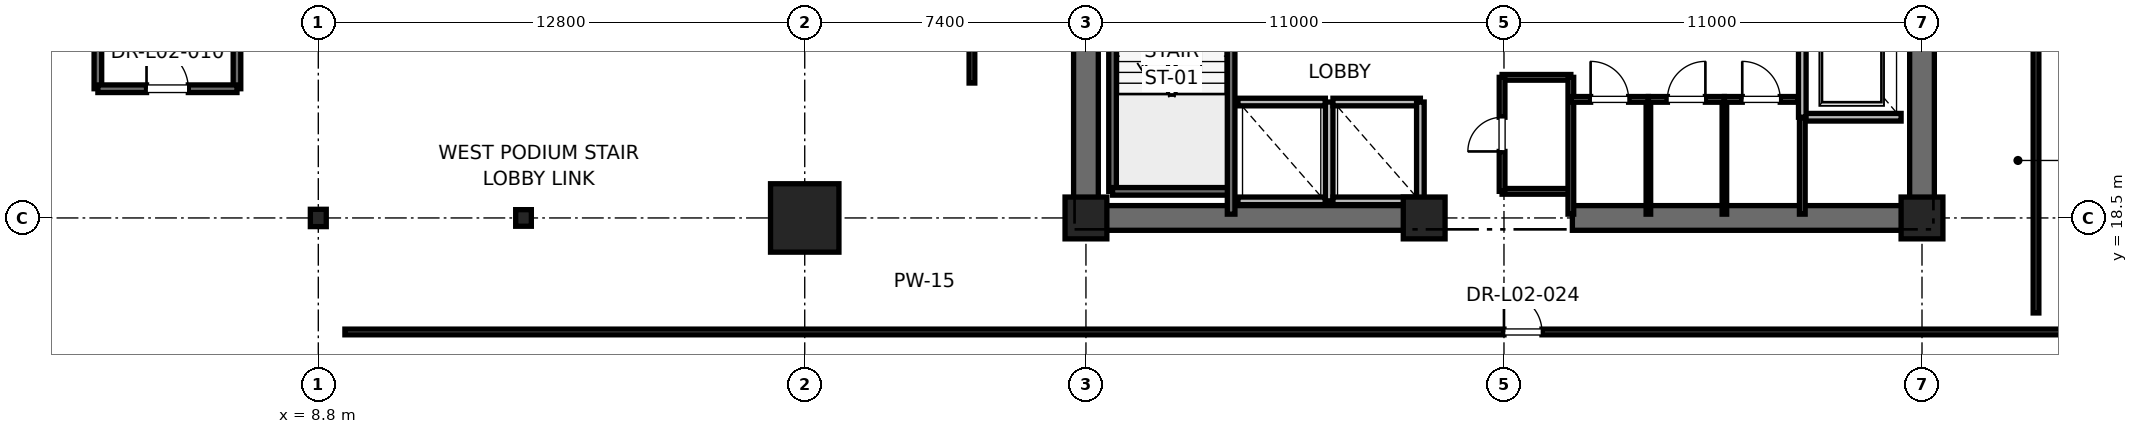
"""IFC4 building model, lengths in metres.
Left out: names, types, materials, properties, quantities, classifications, styles, units other than length and angle.
Written with IfcOpenShell. Run it as: python <this file> out.ifc"""

import sys

from ifc_helpers import new_model, si_unit, direction, frame, frame_2d, origin, origin_2d, place, context, subcontext, project, spatial, rectangle, i_section, extrude, element, fill, save


model = new_model("IFC4")
c1 = context("Model", 3, precision=1e-05, world=origin(), true_north=direction((0.0, 1.0)))
c2 = subcontext(c1, "Body", "Model", "MODEL_VIEW")
j1 = project(units=[si_unit("LENGTHUNIT", "METRE"), si_unit("PLANEANGLEUNIT", "RADIAN")], contexts=[c1])
p1 = place(None, origin())
s1 = spatial("IfcSite", under=j1, at=p1, CompositionType="ELEMENT")
p2 = place(p1, origin())
s2 = spatial("IfcBuilding", under=s1, at=p2, CompositionType="ELEMENT")
p3 = place(p2, frame((0.0, 0.0, 11.2)))
s3 = spatial("IfcBuildingStorey", under=s2, at=p3, CompositionType="ELEMENT", Elevation=11.2)
p4 = place(p3, frame((21.6, 18.5, 0.0), z_axis=(0.0, 0.0, 1.0), x_axis=(1.0, 0.0, 0.0)))
e1 = element("IfcColumn", 1, at=p4, inside=s3, PredefinedType="COLUMN", context=c2, shape_type="SweptSolid", body=[
    extrude(rectangle(XDim=1.8, YDim=1.8, at=origin_2d()), origin(), (0.0, 0.0, 1.0), 5.2),
])
p5 = place(p3, frame((14.2, 18.5, 0.0), z_axis=(0.0, 0.0, 1.0), x_axis=(1.0, 0.0, 0.0)))
e2 = element("IfcColumn", 2, at=p5, inside=s3, PredefinedType="COLUMN", context=c2, shape_type="SweptSolid", body=[
    extrude(i_section(OverallWidth=0.412, OverallDepth=0.437, WebThickness=0.036, FlangeThickness=0.058, FilletRadius=0.015, at=origin_2d()), origin(), (0.0, 0.0, 1.0), 5.2),
])
for number, where, z_axis, x_axis in (
    (3, (29.0, 18.5, 0.0), (0.0, 0.0, 1.0), (1.0, 0.0, 0.0)),
    (4, (51.0, 18.5, 0.0), (0.0, 0.0, 1.0), (1.0, 0.0, 0.0)),
    (5, (37.9, 18.5, 0.0), (0.0, 0.0, 1.0), (1.0, 0.0, 0.0)),
):
    element("IfcColumn", number, at=place(p3, frame(where, z_axis=z_axis, x_axis=x_axis)), inside=s3, PredefinedType="PILASTER", context=c2, shape_type="SweptSolid", body=[
        extrude(rectangle(XDim=1.1, YDim=1.1, at=origin_2d()), origin(), (0.0, 0.0, 1.0), 5.2),
    ])
p6 = place(p3, frame((8.8, 18.5, 0.0), z_axis=(0.0, 0.0, 1.0), x_axis=(1.0, 0.0, 0.0)))
e6 = element("IfcColumn", 6, at=p6, inside=s3, PredefinedType="COLUMN", context=c2, shape_type="SweptSolid", body=[
    extrude(i_section(OverallWidth=0.418, OverallDepth=0.456, WebThickness=0.042, FlangeThickness=0.067, FilletRadius=0.015, at=origin_2d()), origin(), (0.0, 0.0, 1.0), 5.2),
])
for number, where, z_axis, x_axis in (
    (7, (29.0, 18.5, 0.0), (0.0, 0.0, 1.0), (1.0, 0.0, 0.0)),
    (8, (41.8, 18.5, 0.0), (0.0, 0.0, 1.0), (1.0, 0.0, 0.0)),
):
    element("IfcWall", number, at=place(p3, frame(where, z_axis=z_axis, x_axis=x_axis)), inside=s3, PredefinedType="SHEAR", context=c2, shape_type="SweptSolid", body=[
        extrude(rectangle(XDim=9.2, YDim=0.65, at=frame_2d((4.6, 0.0))), origin(), (0.0, 0.0, 1.0), 4.92),
    ])
p7 = place(p3, frame((29.0, 18.5, 0.0), z_axis=(0.0, 0.0, 1.0), x_axis=(0.0, 1.0, 0.0)))
e9 = element("IfcWall", 9, at=p7, inside=s3, PredefinedType="SHEAR", context=c2, shape_type="SweptSolid", body=[
    extrude(rectangle(XDim=8.8, YDim=0.65, at=frame_2d((4.4, 0.0))), origin(), (0.0, 0.0, 1.0), 4.92),
])
p8 = place(p3, frame((51.0, 18.5, 0.0), z_axis=(0.0, 0.0, 1.0), x_axis=(0.0, 1.0, 0.0)))
e10 = element("IfcWall", 10, at=p8, inside=s3, PredefinedType="SHEAR", context=c2, shape_type="SweptSolid", body=[
    extrude(rectangle(XDim=5.8, YDim=0.65, at=frame_2d((2.9, 0.0))), origin(), (0.0, 0.0, 1.0), 4.92),
])
p9 = place(p3, frame((29.7, 19.2, 0.0), z_axis=(0.0, 0.0, 1.0), x_axis=(0.0, 1.0, 0.0)))
e11 = element("IfcWall", 11, at=p9, inside=s3, PredefinedType="SOLIDWALL", context=c2, shape_type="SweptSolid", body=[
    extrude(rectangle(XDim=8.15, YDim=0.2, at=frame_2d((4.075, 0.0))), origin(), (0.0, 0.0, 1.0), 4.92),
])
p10 = place(p3, frame((29.7, 19.2, 0.0), z_axis=(0.0, 0.0, 1.0), x_axis=(1.0, 0.0, 0.0)))
e12 = element("IfcWall", 12, at=p10, inside=s3, PredefinedType="SOLIDWALL", context=c2, shape_type="SweptSolid", body=[
    extrude(rectangle(XDim=3.12, YDim=0.2, at=frame_2d((1.56, 0.0))), origin(), (0.0, 0.0, 1.0), 4.92),
])
p11 = place(p3, frame((32.82, 18.6, 0.0), z_axis=(0.0, 0.0, 1.0), x_axis=(0.0, 1.0, 0.0)))
e13 = element("IfcWall", 13, at=p11, inside=s3, PredefinedType="SOLIDWALL", context=c2, shape_type="SweptSolid", body=[
    extrude(rectangle(XDim=8.78, YDim=0.2, at=frame_2d((4.39, 0.0))), origin(), (0.0, 0.0, 1.0), 4.92),
])
for number, where, z_axis, x_axis in (
    (14, (3.0, 21.9, 0.0), (0.0, 0.0, 1.0), (0.0, 1.0, 0.0)),
    (15, (6.66, 21.9, 0.0), (0.0, 0.0, 1.0), (0.0, 1.0, 0.0)),
):
    element("IfcWall", number, at=place(p3, frame(where, z_axis=z_axis, x_axis=x_axis)), inside=s3, PredefinedType="SOLIDWALL", context=c2, shape_type="SweptSolid", body=[
        extrude(rectangle(XDim=8.7, YDim=0.2, at=frame_2d((4.35, 0.0))), origin(), (0.0, 0.0, 1.0), 4.92),
    ])
p12 = place(p3, frame((3.0, 21.9, 0.0), z_axis=(0.0, 0.0, 1.0), x_axis=(1.0, 0.0, 0.0)))
e16 = element("IfcWall", 16, at=p12, inside=s3, PredefinedType="SOLIDWALL", context=c2, shape_type="SweptSolid", body=[
    extrude(rectangle(XDim=3.66, YDim=0.2, at=frame_2d((1.83, 0.0))), origin(), (0.0, 0.0, 1.0), 4.92),
])
p13 = place(p12, frame((1.28, 0.0, 0.0)))
e17 = element("IfcOpeningElement", 17, at=p13, cuts=e16, PredefinedType="OPENING", context=c2, shape_type="SweptSolid", body=[
    extrude(rectangle(XDim=1.1, YDim=2.15, at=frame_2d((0.55, 1.075))), frame((0.0, 0.1, 0.0), z_axis=(0.0, -1.0, 0.0), x_axis=(1.0, 0.0, 0.0)), (0.0, 0.0, 1.0), 0.2),
])
p14 = place(p3, frame((47.85, 21.15, 0.0), z_axis=(0.0, 0.0, 1.0), x_axis=(1.0, 0.0, 0.0)))
e18 = element("IfcWall", 18, at=p14, inside=s3, PredefinedType="SOLIDWALL", context=c2, shape_type="SweptSolid", body=[
    extrude(rectangle(XDim=2.6, YDim=0.2, at=frame_2d((1.3, 0.0))), origin(), (0.0, 0.0, 1.0), 4.92),
])
p15 = place(p3, frame((47.85, 24.15, 0.0), z_axis=(0.0, 0.0, 1.0), x_axis=(0.0, -1.0, 0.0)))
e19 = element("IfcWall", 19, at=p15, inside=s3, PredefinedType="SOLIDWALL", context=c2, shape_type="SweptSolid", body=[
    extrude(rectangle(XDim=3.0, YDim=0.2, at=frame_2d((1.5, 0.0))), origin(), (0.0, 0.0, 1.0), 4.92),
])
for number, where, z_axis, x_axis in (
    (20, (33.0, 18.95, 0.0), (0.0, 0.0, 1.0), (1.0, 0.0, 0.0)),
    (21, (35.3, 21.55, 0.0), (0.0, 0.0, 1.0), (-1.0, 0.0, 0.0)),
):
    element("IfcWall", number, at=place(p3, frame(where, z_axis=z_axis, x_axis=x_axis)), inside=s3, PredefinedType="SOLIDWALL", context=c2, shape_type="SweptSolid", body=[
        extrude(rectangle(XDim=2.3, YDim=0.2, at=frame_2d((1.15, 0.0))), origin(), (0.0, 0.0, 1.0), 4.92),
    ])
p16 = place(p3, frame((35.4, 18.95, 0.0), z_axis=(0.0, 0.0, 1.0), x_axis=(0.0, 1.0, 0.0)))
e22 = element("IfcWall", 22, at=p16, inside=s3, PredefinedType="SOLIDWALL", context=c2, shape_type="SweptSolid", body=[
    extrude(rectangle(XDim=2.6, YDim=0.2, at=frame_2d((1.3, 0.0))), origin(), (0.0, 0.0, 1.0), 4.92),
])
p17 = place(p3, frame((35.5, 18.95, 0.0), z_axis=(0.0, 0.0, 1.0), x_axis=(1.0, 0.0, 0.0)))
e23 = element("IfcWall", 23, at=p17, inside=s3, PredefinedType="SOLIDWALL", context=c2, shape_type="SweptSolid", body=[
    extrude(rectangle(XDim=2.3, YDim=0.2, at=frame_2d((1.15, 0.0))), origin(), (0.0, 0.0, 1.0), 3.7),
])
p18 = place(p3, frame((37.8, 21.55, 0.0), z_axis=(0.0, 0.0, 1.0), x_axis=(-1.0, 0.0, 0.0)))
e24 = element("IfcWall", 24, at=p18, inside=s3, PredefinedType="SOLIDWALL", context=c2, shape_type="SweptSolid", body=[
    extrude(rectangle(XDim=2.3, YDim=0.2, at=frame_2d((1.15, 0.0))), origin(), (0.0, 0.0, 1.0), 4.92),
])
p19 = place(p3, frame((37.8, 18.95, 0.0), z_axis=(0.0, 0.0, 1.0), x_axis=(0.0, 1.0, 0.0)))
e25 = element("IfcWall", 25, at=p19, inside=s3, PredefinedType="SOLIDWALL", context=c2, shape_type="SweptSolid", body=[
    extrude(rectangle(XDim=2.6, YDim=0.2, at=frame_2d((1.3, 0.0))), origin(), (0.0, 0.0, 1.0), 3.7),
])
for number, where, z_axis, x_axis in (
    (26, (39.95, 19.2, 0.0), (0.0, 0.0, 1.0), (1.0, 0.0, 0.0)),
    (27, (39.95, 22.2, 0.0), (0.0, 0.0, 1.0), (1.0, 0.0, 0.0)),
):
    element("IfcWall", number, at=place(p3, frame(where, z_axis=z_axis, x_axis=x_axis)), inside=s3, PredefinedType="PARTITIONING", context=c2, shape_type="SweptSolid", body=[
        extrude(rectangle(XDim=1.81, YDim=0.15, at=frame_2d((0.905, 0.0))), origin(), (0.0, 0.0, 1.0), 2.85),
    ])
p20 = place(p3, frame((41.76, 18.6, 0.0), z_axis=(0.0, 0.0, 1.0), x_axis=(0.0, 1.0, 0.0)))
e28 = element("IfcWall", 28, at=p20, inside=s3, PredefinedType="PARTITIONING", context=c2, shape_type="SweptSolid", body=[
    extrude(rectangle(XDim=3.6, YDim=0.15, at=frame_2d((1.8, 0.0))), origin(), (0.0, 0.0, 1.0), 2.85),
])
p21 = place(p3, frame((39.95, 19.2, 0.0), z_axis=(0.0, 0.0, 1.0), x_axis=(0.0, 1.0, 0.0)))
e29 = element("IfcWall", 29, at=p21, inside=s3, PredefinedType="PARTITIONING", context=c2, shape_type="SweptSolid", body=[
    extrude(rectangle(XDim=3.0, YDim=0.15, at=frame_2d((1.5, 0.0))), origin(), (0.0, 0.0, 1.0), 2.85),
])
p22 = place(p21, frame((1.05, 0.0, 0.0)))
e30 = element("IfcOpeningElement", 30, at=p22, cuts=e29, PredefinedType="OPENING", context=c2, shape_type="SweptSolid", body=[
    extrude(rectangle(XDim=0.9, YDim=2.1, at=frame_2d((0.45, 1.05))), frame((0.0, 0.075, 0.0), z_axis=(0.0, -1.0, 0.0), x_axis=(1.0, 0.0, 0.0)), (0.0, 0.0, 1.0), 0.15),
])
p23 = place(p3, frame((47.85, 18.6, 0.0), z_axis=(0.0, 0.0, 1.0), x_axis=(0.0, 1.0, 0.0)))
e31 = element("IfcWall", 31, at=p23, inside=s3, PredefinedType="PARTITIONING", context=c2, shape_type="SweptSolid", body=[
    extrude(rectangle(XDim=2.54, YDim=0.15, at=frame_2d((1.27, 0.0))), origin(), (0.0, 0.0, 1.0), 2.85),
])
for number, where, z_axis, x_axis in (
    (32, (43.8, 18.6, 0.0), (0.0, 0.0, 1.0), (0.0, 1.0, 0.0)),
    (33, (45.8, 18.6, 0.0), (0.0, 0.0, 1.0), (0.0, 1.0, 0.0)),
):
    element("IfcWall", number, at=place(p3, frame(where, z_axis=z_axis, x_axis=x_axis)), inside=s3, PredefinedType="PARTITIONING", context=c2, shape_type="SweptSolid", body=[
        extrude(rectangle(XDim=3.02, YDim=0.12, at=frame_2d((1.51, 0.0))), origin(), (0.0, 0.0, 1.0), 2.85),
    ])
p24 = place(p3, frame((41.76, 21.62, 0.0), z_axis=(0.0, 0.0, 1.0), x_axis=(1.0, 0.0, 0.0)))
e34 = element("IfcWall", 34, at=p24, inside=s3, PredefinedType="PARTITIONING", context=c2, shape_type="SweptSolid", body=[
    extrude(rectangle(XDim=2.04, YDim=0.15, at=frame_2d((1.02, 0.0))), origin(), (0.0, 0.0, 1.0), 2.85),
])
p25 = place(p24, frame((0.52, 0.0, 0.0)))
e35 = element("IfcOpeningElement", 35, at=p25, cuts=e34, PredefinedType="OPENING", context=c2, shape_type="SweptSolid", body=[
    extrude(rectangle(XDim=1.0, YDim=2.15, at=frame_2d((0.5, 1.075))), frame((0.0, 0.075, 0.0), z_axis=(0.0, -1.0, 0.0), x_axis=(1.0, 0.0, 0.0)), (0.0, 0.0, 1.0), 0.15),
])
p26 = place(p3, frame((43.8, 21.62, 0.0), z_axis=(0.0, 0.0, 1.0), x_axis=(1.0, 0.0, 0.0)))
e36 = element("IfcWall", 36, at=p26, inside=s3, PredefinedType="PARTITIONING", context=c2, shape_type="SweptSolid", body=[
    extrude(rectangle(XDim=2.0, YDim=0.15, at=frame_2d((1.0, 0.0))), origin(), (0.0, 0.0, 1.0), 2.85),
])
p27 = place(p26, frame((0.5, 0.0, 0.0)))
e37 = element("IfcOpeningElement", 37, at=p27, cuts=e36, PredefinedType="OPENING", context=c2, shape_type="SweptSolid", body=[
    extrude(rectangle(XDim=1.0, YDim=2.15, at=frame_2d((0.5, 1.075))), frame((0.0, 0.075, 0.0), z_axis=(0.0, -1.0, 0.0), x_axis=(1.0, 0.0, 0.0)), (0.0, 0.0, 1.0), 0.15),
])
p28 = place(p3, frame((45.8, 21.62, 0.0), z_axis=(0.0, 0.0, 1.0), x_axis=(1.0, 0.0, 0.0)))
e38 = element("IfcWall", 38, at=p28, inside=s3, PredefinedType="PARTITIONING", context=c2, shape_type="SweptSolid", body=[
    extrude(rectangle(XDim=1.94, YDim=0.15, at=frame_2d((0.97, 0.0))), origin(), (0.0, 0.0, 1.0), 2.85),
])
p29 = place(p28, frame((0.47, 0.0, 0.0)))
e39 = element("IfcOpeningElement", 39, at=p29, cuts=e38, PredefinedType="OPENING", context=c2, shape_type="SweptSolid", body=[
    extrude(rectangle(XDim=1.0, YDim=2.15, at=frame_2d((0.5, 1.075))), frame((0.0, 0.075, 0.0), z_axis=(0.0, -1.0, 0.0), x_axis=(1.0, 0.0, 0.0)), (0.0, 0.0, 1.0), 0.15),
])
p30 = place(p3, frame((9.5, 15.5, 0.0), z_axis=(0.0, 0.0, 1.0), x_axis=(1.0, 0.0, 0.0)))
e40 = element("IfcWall", 40, at=p30, inside=s3, PredefinedType="PARTITIONING", context=c2, shape_type="SweptSolid", body=[
    extrude(rectangle(XDim=62.0, YDim=0.15, at=frame_2d((31.0, 0.0))), origin(), (0.0, 0.0, 1.0), 2.85),
])
p31 = place(p30, frame((30.5, 0.0, 0.0)))
e41 = element("IfcOpeningElement", 41, at=p31, cuts=e40, PredefinedType="OPENING", context=c2, shape_type="SweptSolid", body=[
    extrude(rectangle(XDim=1.0, YDim=2.15, at=frame_2d((0.5, 1.075))), frame((0.0, 0.075, 0.0), z_axis=(0.0, -1.0, 0.0), x_axis=(1.0, 0.0, 0.0)), (0.0, 0.0, 1.0), 0.15),
])
p32 = place(p3, frame((26.0, 22.05, 0.0), z_axis=(0.0, 0.0, 1.0), x_axis=(0.0, 1.0, 0.0)))
e42 = element("IfcWall", 42, at=p32, inside=s3, PredefinedType="PARTITIONING", context=c2, shape_type="SweptSolid", body=[
    extrude(rectangle(XDim=16.95, YDim=0.15, at=frame_2d((8.475, 0.0))), origin(), (0.0, 0.0, 1.0), 2.85),
])
p33 = place(p32, frame((6.675, 0.0, 0.0)))
e43 = element("IfcOpeningElement", 43, at=p33, cuts=e42, PredefinedType="OPENING", context=c2, shape_type="SweptSolid", body=[
    extrude(rectangle(XDim=1.0, YDim=2.15, at=frame_2d((0.5, 1.075))), frame((0.0, 0.075, 0.0), z_axis=(0.0, -1.0, 0.0), x_axis=(1.0, 0.0, 0.0)), (0.0, 0.0, 1.0), 0.15),
])
p34 = place(p3, frame((54.0, 16.0, 0.0), z_axis=(0.0, 0.0, 1.0), x_axis=(0.0, 1.0, 0.0)))
e44 = element("IfcWall", 44, at=p34, inside=s3, PredefinedType="PARTITIONING", context=c2, shape_type="SweptSolid", body=[
    extrude(rectangle(XDim=14.45, YDim=0.15, at=frame_2d((7.225, 0.0))), origin(), (0.0, 0.0, 1.0), 2.85),
])
p35 = place(p34, frame((8.025, 0.0, 0.0)))
e45 = element("IfcOpeningElement", 45, at=p35, cuts=e44, PredefinedType="OPENING", context=c2, shape_type="SweptSolid", body=[
    extrude(rectangle(XDim=1.0, YDim=2.15, at=frame_2d((0.5, 1.075))), frame((0.0, 0.075, 0.0), z_axis=(0.0, -1.0, 0.0), x_axis=(1.0, 0.0, 0.0)), (0.0, 0.0, 1.0), 0.15),
])
p36 = place(p13, origin())
e46 = element("IfcDoor", 46, at=p36, inside=s3, OperationType="SINGLE_SWING_LEFT", PredefinedType="DOOR", context=c2, shape_type="SweptSolid", body=[
    extrude(rectangle(XDim=1.1, YDim=2.15, at=frame_2d((0.55, 1.075))), frame((0.0, 0.025, 0.0), z_axis=(0.0, -1.0, 0.0), x_axis=(1.0, 0.0, 0.0)), (0.0, 0.0, 1.0), 0.05),
])
fill(e17, e46)
p37 = place(p22, origin())
e47 = element("IfcDoor", 47, at=p37, inside=s3, OperationType="SINGLE_SWING_LEFT", PredefinedType="DOOR", context=c2, shape_type="SweptSolid", body=[
    extrude(rectangle(XDim=0.9, YDim=2.1, at=frame_2d((0.45, 1.05))), frame((0.0, 0.025, 0.0), z_axis=(0.0, -1.0, 0.0), x_axis=(1.0, 0.0, 0.0)), (0.0, 0.0, 1.0), 0.05),
])
fill(e30, e47)
p38 = place(p25, origin())
e48 = element("IfcDoor", 48, at=p38, inside=s3, OperationType="SINGLE_SWING_LEFT", PredefinedType="DOOR", context=c2, shape_type="SweptSolid", body=[
    extrude(rectangle(XDim=1.0, YDim=2.15, at=frame_2d((0.5, 1.075))), frame((0.0, 0.025, 0.0), z_axis=(0.0, -1.0, 0.0), x_axis=(1.0, 0.0, 0.0)), (0.0, 0.0, 1.0), 0.05),
])
fill(e35, e48)
p39 = place(p27, origin())
e49 = element("IfcDoor", 49, at=p39, inside=s3, OperationType="SINGLE_SWING_RIGHT", PredefinedType="DOOR", context=c2, shape_type="SweptSolid", body=[
    extrude(rectangle(XDim=1.0, YDim=2.15, at=frame_2d((0.5, 1.075))), frame((0.0, 0.025, 0.0), z_axis=(0.0, -1.0, 0.0), x_axis=(1.0, 0.0, 0.0)), (0.0, 0.0, 1.0), 0.05),
])
fill(e37, e49)
p40 = place(p29, origin())
e50 = element("IfcDoor", 50, at=p40, inside=s3, OperationType="SINGLE_SWING_LEFT", PredefinedType="DOOR", context=c2, shape_type="SweptSolid", body=[
    extrude(rectangle(XDim=1.0, YDim=2.15, at=frame_2d((0.5, 1.075))), frame((0.0, 0.025, 0.0), z_axis=(0.0, -1.0, 0.0), x_axis=(1.0, 0.0, 0.0)), (0.0, 0.0, 1.0), 0.05),
])
fill(e39, e50)
p41 = place(p31, origin())
e51 = element("IfcDoor", 51, at=p41, inside=s3, OperationType="SINGLE_SWING_LEFT", PredefinedType="DOOR", context=c2, shape_type="SweptSolid", body=[
    extrude(rectangle(XDim=1.0, YDim=2.15, at=frame_2d((0.5, 1.075))), frame((0.0, 0.025, 0.0), z_axis=(0.0, -1.0, 0.0), x_axis=(1.0, 0.0, 0.0)), (0.0, 0.0, 1.0), 0.05),
])
fill(e41, e51)
save(model, sys.argv[1])
